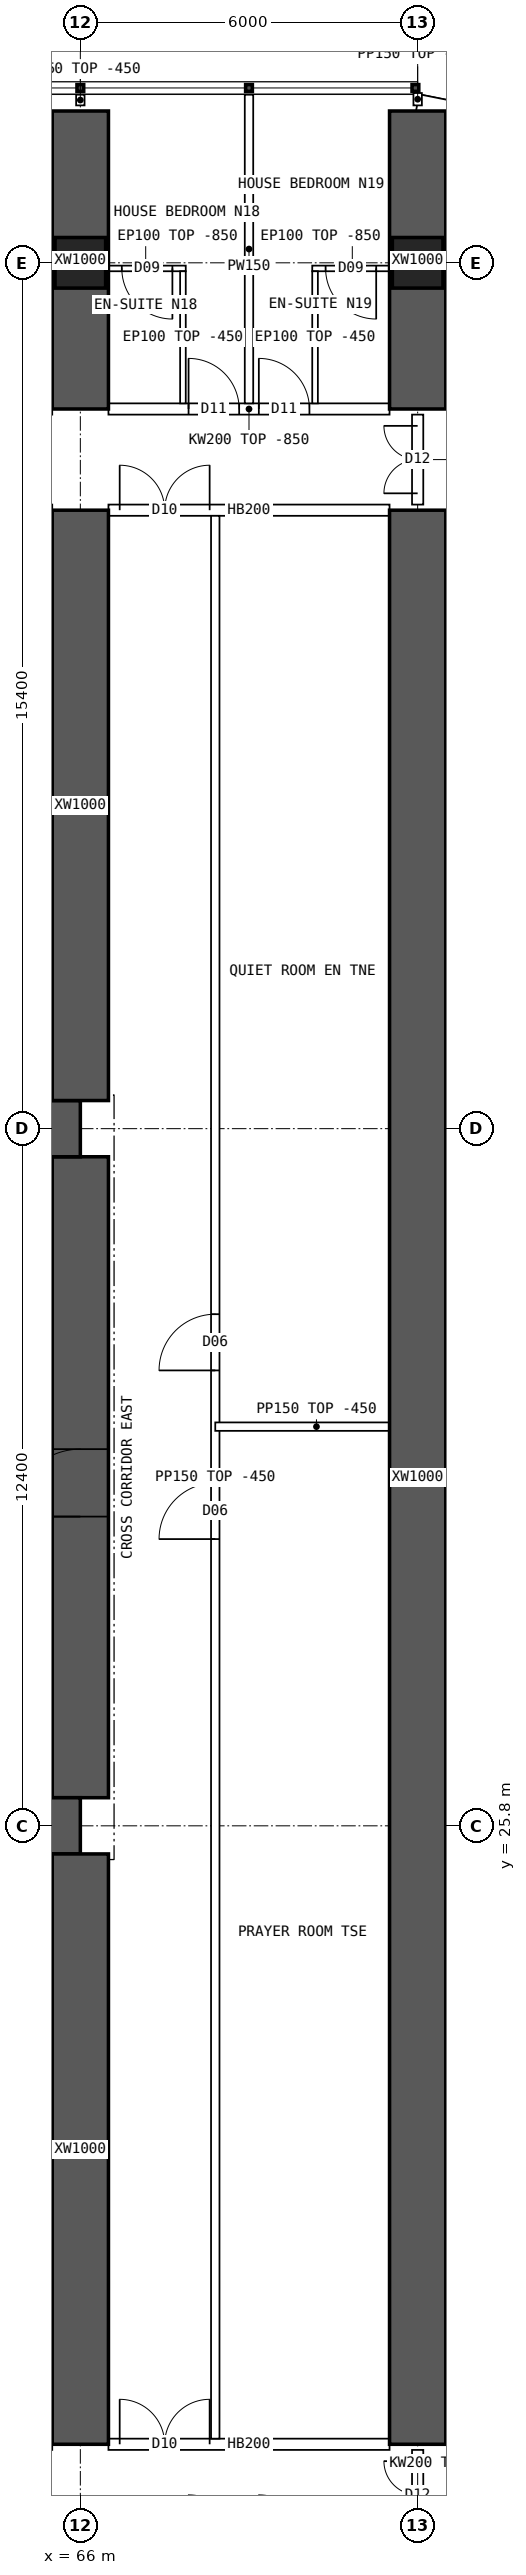
"""IFC4 building model, lengths in metres.
Left out: names, types, materials, properties, quantities, classifications, styles, units other than length and angle.
Written with IfcOpenShell. Run it as: python <this file> out.ifc"""

import sys

from ifc_helpers import new_model, si_unit, direction, frame, frame_2d, origin, origin_2d, place, context, subcontext, project, spatial, polyline, rectangle, hollow_rectangle, outline, extrude, element, fill, save


model = new_model("IFC4")
c1 = context("Model", 3, precision=1e-05, world=origin(), true_north=direction((0.0, 1.0)))
c2 = subcontext(c1, "Body", "Model", "MODEL_VIEW")
j1 = project(units=[si_unit("LENGTHUNIT", "METRE"), si_unit("PLANEANGLEUNIT", "RADIAN")], contexts=[c1])
p1 = place(None, origin())
s1 = spatial("IfcSite", under=j1, at=p1, CompositionType="ELEMENT")
p2 = place(p1, origin())
s2 = spatial("IfcBuilding", under=s1, at=p2, CompositionType="ELEMENT")
p3 = place(p2, frame((0.0, 0.0, 20.2)))
s3 = spatial("IfcBuildingStorey", under=s2, at=p3, CompositionType="ELEMENT", Elevation=20.2)
for number, where, z_axis, x_axis in (
    (1, (66.0, 53.6, 0.0), (0.0, 0.0, 1.0), (1.0, 0.0, 0.0)),
    (2, (72.0, 53.6, 0.0), (0.0, 0.0, 1.0), (1.0, 0.0, 0.0)),
):
    element("IfcColumn", number, at=place(p3, frame(where, z_axis=z_axis, x_axis=x_axis)), inside=s3, PredefinedType="COLUMN", context=c2, shape_type="SweptSolid", body=[
        extrude(hollow_rectangle(XDim=0.9, YDim=0.9, WallThickness=0.09, at=origin_2d()), origin(), (0.0, 0.0, 1.0), 3.75),
    ])
for number, where, z_axis, x_axis in (
    (3, (18.0, 25.8, 0.0), (0.0, 0.0, 1.0), (1.0, 0.0, 0.0)),
    (4, (18.0, 38.2, 0.0), (0.0, 0.0, 1.0), (1.0, 0.0, 0.0)),
):
    element("IfcWall", number, at=place(p3, frame(where, z_axis=z_axis, x_axis=x_axis)), inside=s3, PredefinedType="SHEAR", context=c2, shape_type="SweptSolid", body=[
        extrude(rectangle(XDim=48.0, YDim=1.0, at=frame_2d((24.0, 0.0))), origin(), (0.0, 0.0, 1.0), 3.75),
    ])
p4 = place(p3, frame((66.0, 26.3, 0.0), z_axis=(0.0, 0.0, 1.0), x_axis=(0.0, 1.0, 0.0)))
e5 = element("IfcWall", 5, at=p4, inside=s3, PredefinedType="SHEAR", context=c2, shape_type="SweptSolid", body=[
    extrude(rectangle(XDim=11.4, YDim=1.0, at=frame_2d((5.7, 0.0))), origin(), (0.0, 0.0, 1.0), 3.75),
])
p5 = place(p4, frame((5.0, 0.0, 0.0)))
e6 = element("IfcOpeningElement", 6, at=p5, cuts=e5, PredefinedType="OPENING", context=c2, shape_type="SweptSolid", body=[
    extrude(rectangle(XDim=1.2, YDim=2.1, at=frame_2d((0.6, 1.05))), frame((0.0, 0.51, 0.0), z_axis=(0.0, -1.0, 0.0), x_axis=(1.0, 0.0, 0.0)), (0.0, 0.0, 1.0), 1.02),
])
p6 = place(p3, frame((66.0, 51.0, 0.0), z_axis=(0.0, 0.0, 1.0), x_axis=(0.0, 1.0, 0.0)))
e7 = element("IfcWall", 7, at=p6, inside=s3, PredefinedType="SHEAR", context=c2, shape_type="SweptSolid", body=[
    extrude(rectangle(XDim=5.3, YDim=1.0, at=frame_2d((2.65, 0.0))), origin(), (0.0, 0.0, 1.0), 3.75),
])
for number, where, z_axis, x_axis in (
    (8, (66.0, 14.8, 0.0), (0.0, 0.0, 1.0), (0.0, 1.0, 0.0)),
    (9, (66.0, 38.7, 0.0), (0.0, 0.0, 1.0), (0.0, 1.0, 0.0)),
):
    element("IfcWall", number, at=place(p3, frame(where, z_axis=z_axis, x_axis=x_axis)), inside=s3, PredefinedType="SHEAR", context=c2, shape_type="SweptSolid", body=[
        extrude(rectangle(XDim=10.5, YDim=1.0, at=frame_2d((5.25, 0.0))), origin(), (0.0, 0.0, 1.0), 3.75),
    ])
p7 = place(p3, frame((72.0, 51.0, 0.0), z_axis=(0.0, 0.0, 1.0), x_axis=(0.0, 1.0, 0.0)))
e10 = element("IfcWall", 10, at=p7, inside=s3, PredefinedType="SHEAR", context=c2, shape_type="SweptSolid", body=[
    extrude(rectangle(XDim=5.3, YDim=1.0, at=frame_2d((2.65, 0.0))), origin(), (0.0, 0.0, 1.0), 3.75),
])
p8 = place(p3, frame((72.0, 14.8, 0.0), z_axis=(0.0, 0.0, 1.0), x_axis=(0.0, 1.0, 0.0)))
e11 = element("IfcWall", 11, at=p8, inside=s3, PredefinedType="SHEAR", context=c2, shape_type="SweptSolid", body=[
    extrude(rectangle(XDim=34.4, YDim=1.0, at=frame_2d((17.2, 0.0))), origin(), (0.0, 0.0, 1.0), 3.75),
])
p9 = place(p3, frame((75.157, 55.822, 0.0), z_axis=(0.0, 0.0, 1.0), x_axis=(-0.980787251524, 0.195080412259, 0.0)))
e12 = element("IfcWall", 12, at=p9, inside=s3, PredefinedType="SOLIDWALL", context=c2, shape_type="SweptSolid", body=[
    extrude(outline(polyline([(-0.03, -0.15), (3.249, -0.15), (3.189, 0.15), (0.03, 0.15), (-0.03, -0.15)])), origin(), (0.0, 0.0, 1.0), 3.3),
])
p10 = place(p9, frame((0.909, 0.0, 0.9)))
e13 = element("IfcOpeningElement", 13, at=p10, cuts=e12, PredefinedType="OPENING", context=c2, shape_type="SweptSolid", body=[
    extrude(rectangle(XDim=1.4, YDim=1.8, at=frame_2d((0.7, 0.9))), frame((0.0, 0.16, 0.0), z_axis=(0.0, -1.0, 0.0), x_axis=(1.0, 0.0, 0.0)), (0.0, 0.0, 1.0), 0.32),
])
p11 = place(p3, frame((66.5, 14.8, 0.0), z_axis=(0.0, 0.0, 1.0), x_axis=(1.0, 0.0, 0.0)))
e14 = element("IfcWall", 14, at=p11, inside=s3, PredefinedType="SOLIDWALL", context=c2, shape_type="SweptSolid", body=[
    extrude(rectangle(XDim=5.0, YDim=0.2, at=frame_2d((2.5, 0.0))), origin(), (0.0, 0.0, 1.0), 3.3),
])
p12 = place(p11, frame((0.2, 0.0, 0.0)))
e15 = element("IfcOpeningElement", 15, at=p12, cuts=e14, PredefinedType="OPENING", context=c2, shape_type="SweptSolid", body=[
    extrude(rectangle(XDim=1.6, YDim=2.1, at=frame_2d((0.8, 1.05))), frame((0.0, 0.11, 0.0), z_axis=(0.0, -1.0, 0.0), x_axis=(1.0, 0.0, 0.0)), (0.0, 0.0, 1.0), 0.22),
])
p13 = place(p3, frame((66.5, 51.0, 0.0), z_axis=(0.0, 0.0, 1.0), x_axis=(1.0, 0.0, 0.0)))
e16 = element("IfcWall", 16, at=p13, inside=s3, PredefinedType="SOLIDWALL", context=c2, shape_type="SweptSolid", body=[
    extrude(outline(polyline([(0.0, 0.0), (5.0, 0.0), (5.0, 2.9), (0.0, 2.9), (0.0, 0.0)])), frame((0.0, 0.1, 0.0), z_axis=(0.0, -1.0, 0.0), x_axis=(1.0, 0.0, 0.0)), (0.0, 0.0, 1.0), 0.2),
])
p14 = place(p13, frame((1.425, 0.0, 0.0)))
e17 = element("IfcOpeningElement", 17, at=p14, cuts=e16, PredefinedType="OPENING", context=c2, shape_type="SweptSolid", body=[
    extrude(rectangle(XDim=0.9, YDim=2.1, at=frame_2d((0.45, 1.05))), frame((0.0, 0.11, 0.0), z_axis=(0.0, -1.0, 0.0), x_axis=(1.0, 0.0, 0.0)), (0.0, 0.0, 1.0), 0.22),
])
p15 = place(p13, frame((2.675, 0.0, 0.0)))
e18 = element("IfcOpeningElement", 18, at=p15, cuts=e16, PredefinedType="OPENING", context=c2, shape_type="SweptSolid", body=[
    extrude(rectangle(XDim=0.9, YDim=2.1, at=frame_2d((0.45, 1.05))), frame((0.0, 0.11, 0.0), z_axis=(0.0, -1.0, 0.0), x_axis=(1.0, 0.0, 0.0)), (0.0, 0.0, 1.0), 0.22),
])
p16 = place(p3, frame((66.5, 49.2, 0.0), z_axis=(0.0, 0.0, 1.0), x_axis=(1.0, 0.0, 0.0)))
e19 = element("IfcWall", 19, at=p16, inside=s3, PredefinedType="SOLIDWALL", context=c2, shape_type="SweptSolid", body=[
    extrude(rectangle(XDim=5.0, YDim=0.2, at=frame_2d((2.5, 0.0))), origin(), (0.0, 0.0, 1.0), 3.3),
])
p17 = place(p16, frame((0.2, 0.0, 0.0)))
e20 = element("IfcOpeningElement", 20, at=p17, cuts=e19, PredefinedType="OPENING", context=c2, shape_type="SweptSolid", body=[
    extrude(rectangle(XDim=1.6, YDim=2.1, at=frame_2d((0.8, 1.05))), frame((0.0, 0.11, 0.0), z_axis=(0.0, -1.0, 0.0), x_axis=(1.0, 0.0, 0.0)), (0.0, 0.0, 1.0), 0.22),
])
p18 = place(p3, frame((64.125, 53.5, 0.0), z_axis=(0.0, 0.0, 1.0), x_axis=(1.0, 0.0, 0.0)))
e21 = element("IfcWall", 21, at=p18, inside=s3, PredefinedType="PARTITIONING", context=c2, shape_type="SweptSolid", body=[
    extrude(outline(polyline([(0.0, 0.0), (1.425, 0.0), (1.425, 2.9), (0.0, 2.9), (0.0, 0.0)])), frame((0.0, 0.05, 0.0), z_axis=(0.0, -1.0, 0.0), x_axis=(1.0, 0.0, 0.0)), (0.0, 0.0, 1.0), 0.1),
])
p19 = place(p18, frame((0.238, 0.0, 0.0)))
e22 = element("IfcOpeningElement", 22, at=p19, cuts=e21, PredefinedType="OPENING", context=c2, shape_type="SweptSolid", body=[
    extrude(rectangle(XDim=0.9, YDim=2.1, at=frame_2d((0.45, 1.05))), frame((0.0, 0.06, 0.0), z_axis=(0.0, -1.0, 0.0), x_axis=(1.0, 0.0, 0.0)), (0.0, 0.0, 1.0), 0.12),
])
p20 = place(p3, frame((69.0, 56.59, 0.0), z_axis=(0.0, 0.0, 1.0), x_axis=(0.0, -1.0, 0.0)))
e23 = element("IfcWall", 23, at=p20, inside=s3, PredefinedType="PARTITIONING", context=c2, shape_type="SweptSolid", body=[
    extrude(outline(polyline([(0.0, 0.0), (5.49, 0.0), (5.49, 2.9), (5.442, 2.9), (5.44, 3.3), (3.192, 3.3), (3.19, 2.9), (2.792, 2.9), (2.79, 3.3), (0.0, 3.3), (0.0, 0.0)])), frame((0.0, 0.075, 0.0), z_axis=(0.0, -1.0, 0.0), x_axis=(1.0, 0.0, 0.0)), (0.0, 0.0, 1.0), 0.15),
])
p21 = place(p3, frame((66.45, 53.5, 0.0), z_axis=(0.0, 0.0, 1.0), x_axis=(1.0, 0.0, 0.0)))
e24 = element("IfcWall", 24, at=p21, inside=s3, PredefinedType="PARTITIONING", context=c2, shape_type="SweptSolid", body=[
    extrude(outline(polyline([(0.0, 0.0), (1.425, 0.0), (1.425, 2.9), (0.0, 2.9), (0.0, 0.0)])), frame((0.0, 0.05, 0.0), z_axis=(0.0, -1.0, 0.0), x_axis=(1.0, 0.0, 0.0)), (0.0, 0.0, 1.0), 0.1),
])
p22 = place(p21, frame((0.288, 0.0, 0.0)))
e25 = element("IfcOpeningElement", 25, at=p22, cuts=e24, PredefinedType="OPENING", context=c2, shape_type="SweptSolid", body=[
    extrude(rectangle(XDim=0.9, YDim=2.1, at=frame_2d((0.45, 1.05))), frame((0.0, 0.06, 0.0), z_axis=(0.0, -1.0, 0.0), x_axis=(1.0, 0.0, 0.0)), (0.0, 0.0, 1.0), 0.12),
])
p23 = place(p3, frame((67.825, 53.45, 0.0), z_axis=(0.0, 0.0, 1.0), x_axis=(0.0, -1.0, 0.0)))
e26 = element("IfcWall", 26, at=p23, inside=s3, PredefinedType="PARTITIONING", context=c2, shape_type="SweptSolid", body=[
    extrude(outline(polyline([(0.0, 0.0), (2.35, 0.0), (2.35, 2.9), (2.302, 2.9), (2.3, 3.3), (0.052, 3.3), (0.05, 2.9), (0.0, 2.9), (0.0, 0.0)])), frame((0.0, 0.05, 0.0), z_axis=(0.0, -1.0, 0.0), x_axis=(1.0, 0.0, 0.0)), (0.0, 0.0, 1.0), 0.1),
])
p24 = place(p3, frame((70.125, 53.5, 0.0), z_axis=(0.0, 0.0, 1.0), x_axis=(1.0, 0.0, 0.0)))
e27 = element("IfcWall", 27, at=p24, inside=s3, PredefinedType="PARTITIONING", context=c2, shape_type="SweptSolid", body=[
    extrude(outline(polyline([(0.0, 0.0), (1.425, 0.0), (1.425, 2.9), (0.0, 2.9), (0.0, 0.0)])), frame((0.0, 0.05, 0.0), z_axis=(0.0, -1.0, 0.0), x_axis=(1.0, 0.0, 0.0)), (0.0, 0.0, 1.0), 0.1),
])
p25 = place(p24, frame((0.238, 0.0, 0.0)))
e28 = element("IfcOpeningElement", 28, at=p25, cuts=e27, PredefinedType="OPENING", context=c2, shape_type="SweptSolid", body=[
    extrude(rectangle(XDim=0.9, YDim=2.1, at=frame_2d((0.45, 1.05))), frame((0.0, 0.06, 0.0), z_axis=(0.0, -1.0, 0.0), x_axis=(1.0, 0.0, 0.0)), (0.0, 0.0, 1.0), 0.12),
])
p26 = place(p3, frame((70.175, 53.45, 0.0), z_axis=(0.0, 0.0, 1.0), x_axis=(0.0, -1.0, 0.0)))
e29 = element("IfcWall", 29, at=p26, inside=s3, PredefinedType="PARTITIONING", context=c2, shape_type="SweptSolid", body=[
    extrude(outline(polyline([(0.0, 0.0), (2.35, 0.0), (2.35, 2.9), (2.302, 2.9), (2.3, 3.3), (0.052, 3.3), (0.05, 2.9), (0.0, 2.9), (0.0, 0.0)])), frame((0.0, 0.05, 0.0), z_axis=(0.0, -1.0, 0.0), x_axis=(1.0, 0.0, 0.0)), (0.0, 0.0, 1.0), 0.1),
])
p27 = place(p3, frame((68.4, 14.9, 0.0), z_axis=(0.0, 0.0, 1.0), x_axis=(0.0, 1.0, 0.0)))
e30 = element("IfcWall", 30, at=p27, inside=s3, PredefinedType="PARTITIONING", context=c2, shape_type="SweptSolid", body=[
    extrude(rectangle(XDim=34.2, YDim=0.15, at=frame_2d((17.1, 0.0))), origin(), (0.0, 0.0, 1.0), 3.3),
])
p28 = place(p27, frame((16.0, 0.0, 0.0)))
e31 = element("IfcOpeningElement", 31, at=p28, cuts=e30, PredefinedType="OPENING", context=c2, shape_type="SweptSolid", body=[
    extrude(rectangle(XDim=1.0, YDim=2.1, at=frame_2d((0.5, 1.05))), frame((0.0, 0.085, 0.0), z_axis=(0.0, -1.0, 0.0), x_axis=(1.0, 0.0, 0.0)), (0.0, 0.0, 1.0), 0.17),
])
p29 = place(p27, frame((19.0, 0.0, 0.0)))
e32 = element("IfcOpeningElement", 32, at=p29, cuts=e30, PredefinedType="OPENING", context=c2, shape_type="SweptSolid", body=[
    extrude(rectangle(XDim=1.0, YDim=2.1, at=frame_2d((0.5, 1.05))), frame((0.0, 0.085, 0.0), z_axis=(0.0, -1.0, 0.0), x_axis=(1.0, 0.0, 0.0)), (0.0, 0.0, 1.0), 0.17),
])
p30 = place(p3, frame((68.4, 32.9, 0.0), z_axis=(0.0, 0.0, 1.0), x_axis=(1.0, 0.0, 0.0)))
e33 = element("IfcWall", 33, at=p30, inside=s3, PredefinedType="PARTITIONING", context=c2, shape_type="SweptSolid", body=[
    extrude(rectangle(XDim=3.6, YDim=0.15, at=frame_2d((1.8, 0.0))), origin(), (0.0, 0.0, 1.0), 3.3),
])
p31 = place(p3, frame((72.075, 30.85, 0.0), z_axis=(0.0, 0.0, 1.0), x_axis=(1.0, 0.0, 0.0)))
e34 = element("IfcWall", 34, at=p31, inside=s3, PredefinedType="PARTITIONING", context=c2, shape_type="SweptSolid", body=[
    extrude(outline(polyline([(0.0, 0.0), (8.02, 0.0), (8.02, 3.3), (6.227, 3.3), (6.225, 2.85), (5.627, 2.85), (5.625, 3.3), (0.0, 3.3), (0.0, 0.0)])), frame((0.0, 0.075, 0.0), z_axis=(0.0, -1.0, 0.0), x_axis=(1.0, 0.0, 0.0)), (0.0, 0.0, 1.0), 0.15),
])
p32 = place(p3, frame((72.0, 13.1, 0.0), z_axis=(0.0, 0.0, 1.0), x_axis=(0.0, 1.0, 0.0)))
e35 = element("IfcWall", 35, at=p32, inside=s3, PredefinedType="SOLIDWALL", context=c2, shape_type="SweptSolid", body=[
    extrude(outline(polyline([(0.0, 0.0), (1.6, 0.0), (1.6, 2.85), (0.0, 2.85), (0.0, 0.0)])), frame((0.0, 0.1, 0.0), z_axis=(0.0, -1.0, 0.0), x_axis=(1.0, 0.0, 0.0)), (0.0, 0.0, 1.0), 0.2),
])
p33 = place(p32, frame((0.2, 0.0, 0.0)))
e36 = element("IfcOpeningElement", 36, at=p33, cuts=e35, PredefinedType="OPENING", context=c2, shape_type="SweptSolid", body=[
    extrude(rectangle(XDim=1.2, YDim=2.1, at=frame_2d((0.6, 1.05))), frame((0.0, 0.11, 0.0), z_axis=(0.0, -1.0, 0.0), x_axis=(1.0, 0.0, 0.0)), (0.0, 0.0, 1.0), 0.22),
])
p34 = place(p3, frame((72.0, 49.3, 0.0), z_axis=(0.0, 0.0, 1.0), x_axis=(0.0, 1.0, 0.0)))
e37 = element("IfcWall", 37, at=p34, inside=s3, PredefinedType="SOLIDWALL", context=c2, shape_type="SweptSolid", body=[
    extrude(outline(polyline([(0.0, 0.0), (1.6, 0.0), (1.6, 2.85), (0.0, 2.85), (0.0, 0.0)])), frame((0.0, 0.1, 0.0), z_axis=(0.0, -1.0, 0.0), x_axis=(1.0, 0.0, 0.0)), (0.0, 0.0, 1.0), 0.2),
])
p35 = place(p34, frame((0.2, 0.0, 0.0)))
e38 = element("IfcOpeningElement", 38, at=p35, cuts=e37, PredefinedType="OPENING", context=c2, shape_type="SweptSolid", body=[
    extrude(rectangle(XDim=1.2, YDim=2.1, at=frame_2d((0.6, 1.05))), frame((0.0, 0.11, 0.0), z_axis=(0.0, -1.0, 0.0), x_axis=(1.0, 0.0, 0.0)), (0.0, 0.0, 1.0), 0.22),
])
p36 = place(p3, frame((66.0, 56.4, 0.0), z_axis=(0.0, 0.0, 1.0), x_axis=(0.0, 1.0, 0.0)))
e39 = element("IfcWall", 39, at=p36, inside=s3, PredefinedType="PARTITIONING", context=c2, shape_type="SweptSolid", body=[
    extrude(rectangle(XDim=0.19, YDim=0.15, at=frame_2d((0.095, 0.0))), origin(), (0.0, 0.0, 1.0), 3.3),
])
p37 = place(p3, frame((72.0, 56.4, 0.0), z_axis=(0.0, 0.0, 1.0), x_axis=(0.0, 1.0, 0.0)))
e40 = element("IfcWall", 40, at=p37, inside=s3, PredefinedType="PARTITIONING", context=c2, shape_type="SweptSolid", body=[
    extrude(rectangle(XDim=0.22, YDim=0.15, at=frame_2d((0.11, 0.0))), origin(), (0.0, 0.0, 1.0), 3.3),
])
p38 = place(p5, origin())
e41 = element("IfcDoor", 41, at=p38, inside=s3, OperationType="SINGLE_SWING_LEFT", PredefinedType="DOOR", context=c2, shape_type="SweptSolid", body=[
    extrude(rectangle(XDim=1.2, YDim=2.1, at=frame_2d((0.6, 1.05))), frame((0.0, 0.025, 0.0), z_axis=(0.0, -1.0, 0.0), x_axis=(1.0, 0.0, 0.0)), (0.0, 0.0, 1.0), 0.05),
])
fill(e6, e41)
p39 = place(p12, origin())
e42 = element("IfcDoor", 42, at=p39, inside=s3, OperationType="DOUBLE_DOOR_SINGLE_SWING", PredefinedType="DOOR", context=c2, shape_type="SweptSolid", body=[
    extrude(rectangle(XDim=1.6, YDim=2.1, at=frame_2d((0.8, 1.05))), frame((0.0, 0.025, 0.0), z_axis=(0.0, -1.0, 0.0), x_axis=(1.0, 0.0, 0.0)), (0.0, 0.0, 1.0), 0.05),
])
fill(e15, e42)
p40 = place(p17, origin())
e43 = element("IfcDoor", 43, at=p40, inside=s3, OperationType="DOUBLE_DOOR_SINGLE_SWING", PredefinedType="DOOR", context=c2, shape_type="SweptSolid", body=[
    extrude(rectangle(XDim=1.6, YDim=2.1, at=frame_2d((0.8, 1.05))), frame((0.0, 0.025, 0.0), z_axis=(0.0, -1.0, 0.0), x_axis=(1.0, 0.0, 0.0)), (0.0, 0.0, 1.0), 0.05),
])
fill(e20, e43)
p41 = place(p22, origin())
e44 = element("IfcDoor", 44, at=p41, inside=s3, OperationType="SINGLE_SWING_RIGHT", PredefinedType="DOOR", context=c2, shape_type="SweptSolid", body=[
    extrude(rectangle(XDim=0.9, YDim=2.1, at=frame_2d((0.45, 1.05))), frame((0.0, 0.025, 0.0), z_axis=(0.0, -1.0, 0.0), x_axis=(1.0, 0.0, 0.0)), (0.0, 0.0, 1.0), 0.05),
])
fill(e25, e44)
p42 = place(p14, origin())
e45 = element("IfcDoor", 45, at=p42, inside=s3, OperationType="SINGLE_SWING_LEFT", PredefinedType="DOOR", context=c2, shape_type="SweptSolid", body=[
    extrude(rectangle(XDim=0.9, YDim=2.1, at=frame_2d((0.45, 1.05))), frame((0.0, 0.025, 0.0), z_axis=(0.0, -1.0, 0.0), x_axis=(1.0, 0.0, 0.0)), (0.0, 0.0, 1.0), 0.05),
])
fill(e17, e45)
p43 = place(p25, origin())
e46 = element("IfcDoor", 46, at=p43, inside=s3, OperationType="SINGLE_SWING_RIGHT", PredefinedType="DOOR", context=c2, shape_type="SweptSolid", body=[
    extrude(rectangle(XDim=0.9, YDim=2.1, at=frame_2d((0.45, 1.05))), frame((0.0, 0.025, 0.0), z_axis=(0.0, -1.0, 0.0), x_axis=(1.0, 0.0, 0.0)), (0.0, 0.0, 1.0), 0.05),
])
fill(e28, e46)
p44 = place(p15, origin())
e47 = element("IfcDoor", 47, at=p44, inside=s3, OperationType="SINGLE_SWING_LEFT", PredefinedType="DOOR", context=c2, shape_type="SweptSolid", body=[
    extrude(rectangle(XDim=0.9, YDim=2.1, at=frame_2d((0.45, 1.05))), frame((0.0, 0.025, 0.0), z_axis=(0.0, -1.0, 0.0), x_axis=(1.0, 0.0, 0.0)), (0.0, 0.0, 1.0), 0.05),
])
fill(e18, e47)
p45 = place(p28, origin())
e48 = element("IfcDoor", 48, at=p45, inside=s3, OperationType="SINGLE_SWING_LEFT", PredefinedType="DOOR", context=c2, shape_type="SweptSolid", body=[
    extrude(rectangle(XDim=1.0, YDim=2.1, at=frame_2d((0.5, 1.05))), frame((0.0, 0.025, 0.0), z_axis=(0.0, -1.0, 0.0), x_axis=(1.0, 0.0, 0.0)), (0.0, 0.0, 1.0), 0.05),
])
fill(e31, e48)
p46 = place(p29, origin())
e49 = element("IfcDoor", 49, at=p46, inside=s3, OperationType="SINGLE_SWING_LEFT", PredefinedType="DOOR", context=c2, shape_type="SweptSolid", body=[
    extrude(rectangle(XDim=1.0, YDim=2.1, at=frame_2d((0.5, 1.05))), frame((0.0, 0.025, 0.0), z_axis=(0.0, -1.0, 0.0), x_axis=(1.0, 0.0, 0.0)), (0.0, 0.0, 1.0), 0.05),
])
fill(e32, e49)
p47 = place(p33, origin())
e50 = element("IfcDoor", 50, at=p47, inside=s3, OperationType="DOUBLE_DOOR_SINGLE_SWING", PredefinedType="DOOR", context=c2, shape_type="SweptSolid", body=[
    extrude(rectangle(XDim=1.2, YDim=2.1, at=frame_2d((0.6, 1.05))), frame((0.0, 0.025, 0.0), z_axis=(0.0, -1.0, 0.0), x_axis=(1.0, 0.0, 0.0)), (0.0, 0.0, 1.0), 0.05),
])
fill(e36, e50)
p48 = place(p35, origin())
e51 = element("IfcDoor", 51, at=p48, inside=s3, OperationType="DOUBLE_DOOR_SINGLE_SWING", PredefinedType="DOOR", context=c2, shape_type="SweptSolid", body=[
    extrude(rectangle(XDim=1.2, YDim=2.1, at=frame_2d((0.6, 1.05))), frame((0.0, 0.025, 0.0), z_axis=(0.0, -1.0, 0.0), x_axis=(1.0, 0.0, 0.0)), (0.0, 0.0, 1.0), 0.05),
])
fill(e38, e51)
save(model, sys.argv[1])
